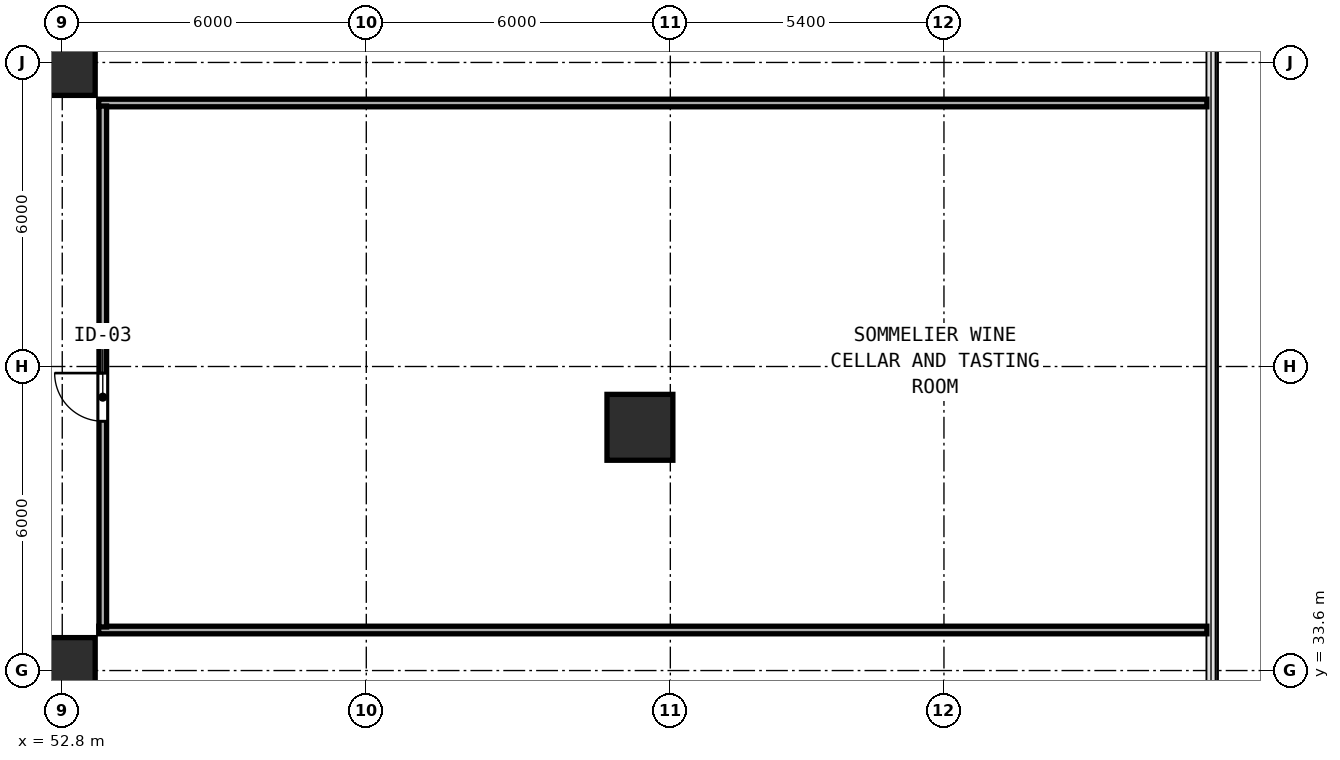
"""IFC4 building model, lengths in metres.
Left out: names, types, materials, properties, quantities, classifications, styles, units other than length and angle.
Written with IfcOpenShell. Run it as: python <this file> out.ifc"""

import sys

from ifc_helpers import new_model, si_unit, direction, frame, frame_2d, origin, origin_2d, place, context, subcontext, project, spatial, rectangle, hollow_rectangle, extrude, element, fill, save


model = new_model("IFC4")
c1 = context("Model", 3, precision=1e-05, world=origin(), true_north=direction((0.0, 1.0)))
c2 = subcontext(c1, "Body", "Model", "MODEL_VIEW")
j1 = project(units=[si_unit("LENGTHUNIT", "METRE"), si_unit("PLANEANGLEUNIT", "RADIAN")], contexts=[c1])
p1 = place(None, origin())
s1 = spatial("IfcSite", under=j1, at=p1, CompositionType="ELEMENT")
p2 = place(p1, origin())
s2 = spatial("IfcBuilding", under=s1, at=p2, CompositionType="ELEMENT")
p3 = place(p2, frame((0.0, 0.0, 5.4)))
s3 = spatial("IfcBuildingStorey", under=s2, at=p3, CompositionType="ELEMENT", Elevation=5.4)
for number, where, z_axis, x_axis in (
    (1, (52.8, 33.6, 0.0), (0.0, 0.0, 1.0), (1.0, 0.0, 0.0)),
    (2, (52.8, 45.6, 0.0), (0.0, 0.0, 1.0), (1.0, 0.0, 0.0)),
    (3, (64.2, 38.4, 0.0), (0.0, 0.0, 1.0), (1.0, 0.0, 0.0)),
):
    element("IfcColumn", number, at=place(p3, frame(where, z_axis=z_axis, x_axis=x_axis)), inside=s3, PredefinedType="COLUMN", context=c2, shape_type="SweptSolid", body=[
        extrude(hollow_rectangle(XDim=1.3, YDim=1.3, WallThickness=0.048, at=origin_2d()), origin(), (0.0, 0.0, 1.0), 4.8),
    ])
for number, where, z_axis, x_axis in (
    (4, (53.52, 44.8, 0.0), (0.0, 0.0, 1.0), (1.0, 0.0, 0.0)),
    (5, (53.52, 34.4, 0.0), (0.0, 0.0, 1.0), (1.0, 0.0, 0.0)),
):
    element("IfcWall", number, at=place(p3, frame(where, z_axis=z_axis, x_axis=x_axis)), inside=s3, PredefinedType="PARTITIONING", context=c2, shape_type="SweptSolid", body=[
        extrude(rectangle(XDim=21.868, YDim=0.15, at=frame_2d((10.934, 0.0))), origin(), (0.0, 0.0, 1.0), 4.56),
    ])
p4 = place(p3, frame((53.6, 34.46, 0.0), z_axis=(0.0, 0.0, 1.0), x_axis=(0.0, 1.0, 0.0)))
e6 = element("IfcWall", 6, at=p4, inside=s3, PredefinedType="PARTITIONING", context=c2, shape_type="SweptSolid", body=[
    extrude(rectangle(XDim=10.28, YDim=0.15, at=frame_2d((5.14, 0.0))), origin(), (0.0, 0.0, 1.0), 4.56),
])
p5 = place(p4, frame((4.06, 0.0, 0.0)))
e7 = element("IfcOpeningElement", 7, at=p5, cuts=e6, PredefinedType="OPENING", context=c2, shape_type="SweptSolid", body=[
    extrude(rectangle(XDim=0.95, YDim=2.12, at=frame_2d((0.475, 1.06))), frame((0.0, 0.085, 0.0), z_axis=(0.0, -1.0, 0.0), x_axis=(1.0, 0.0, 0.0)), (0.0, 0.0, 1.0), 0.17),
])
p6 = place(p5, origin())
e8 = element("IfcDoor", 8, at=p6, inside=s3, OperationType="SINGLE_SWING_RIGHT", PredefinedType="DOOR", context=c2, shape_type="SweptSolid", body=[
    extrude(rectangle(XDim=0.95, YDim=2.12, at=frame_2d((0.475, 1.06))), frame((0.0, 0.025, 0.0), z_axis=(0.0, -1.0, 0.0), x_axis=(1.0, 0.0, 0.0)), (0.0, 0.0, 1.0), 0.05),
])
fill(e7, e8)
save(model, sys.argv[1])
